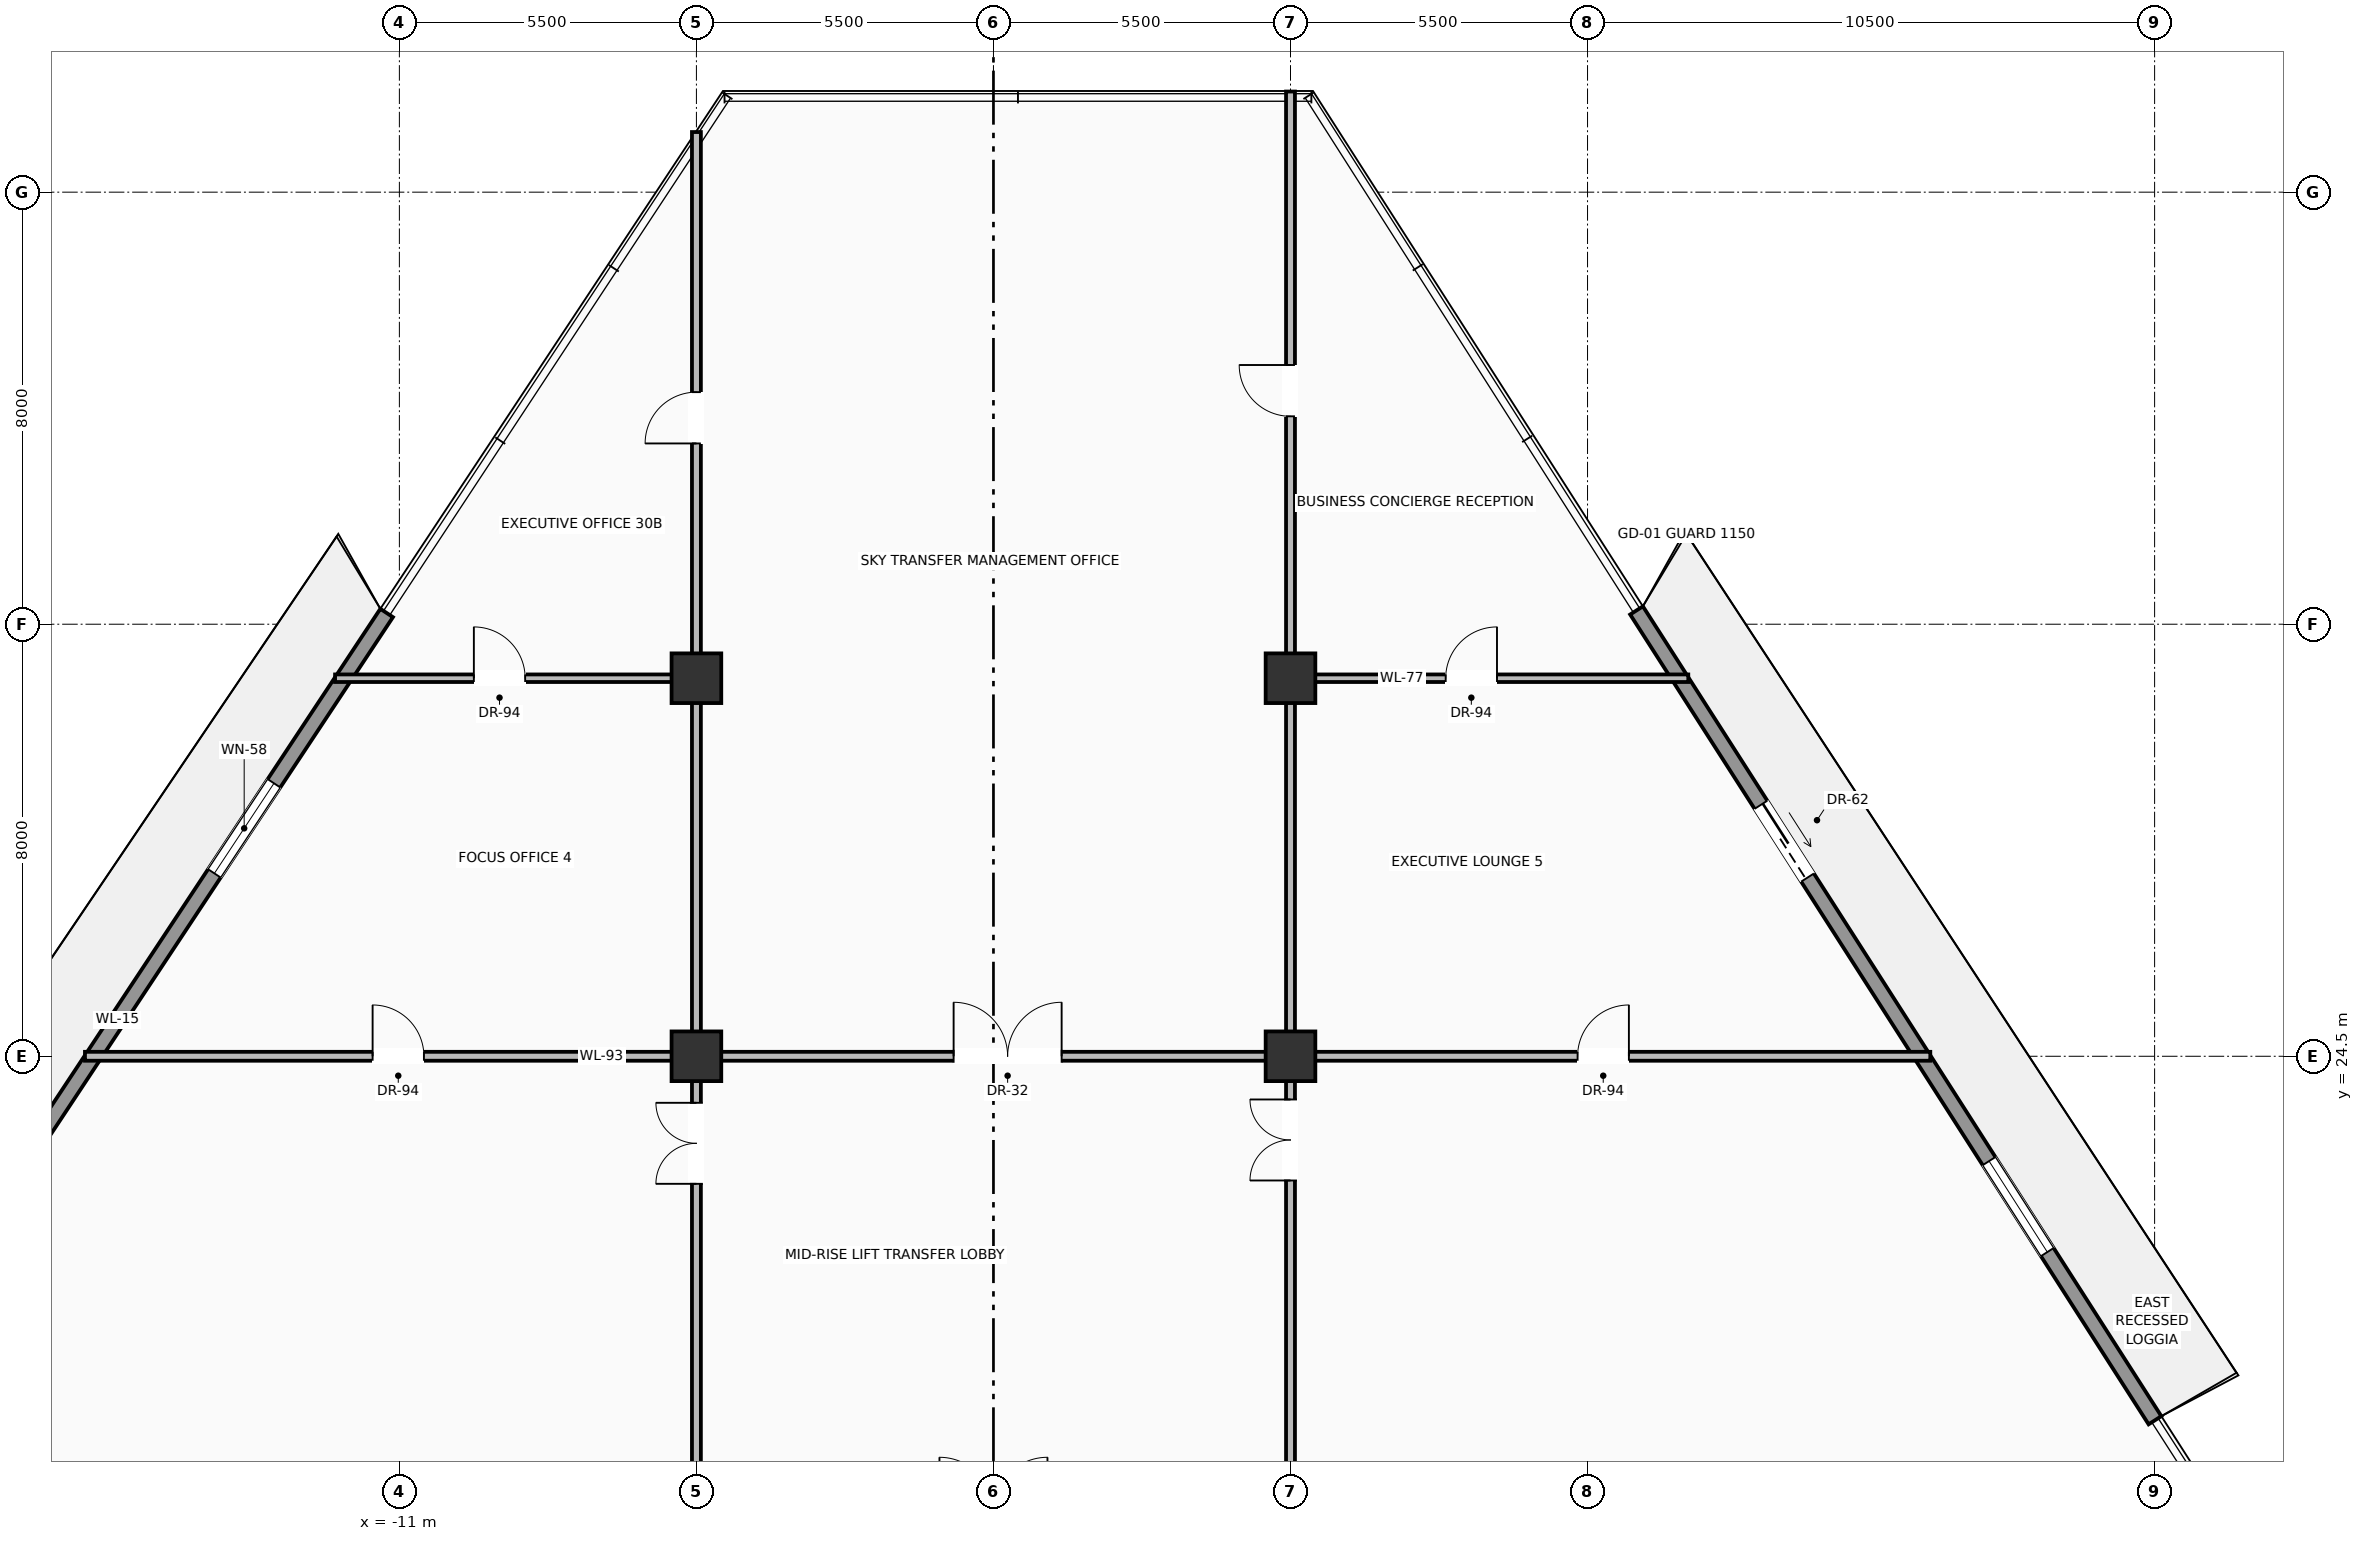
"""IFC4 building model, lengths in metres.
Left out: names, types, materials, properties, quantities, classifications, styles, units other than length and angle.
Written with IfcOpenShell. Run it as: python <this file> out.ifc"""

import sys

from ifc_helpers import new_model, si_unit, direction, frame, frame_2d, origin, origin_2d, place, context, subcontext, project, spatial, rectangle, extrude, source, transform, mapped, element, fill, save


model = new_model("IFC4")
c1 = context("Model", 3, precision=1e-05, world=origin(), true_north=direction((0.0, 1.0)))
c2 = subcontext(c1, "Body", "Model", "MODEL_VIEW")
j1 = project(units=[si_unit("LENGTHUNIT", "METRE"), si_unit("PLANEANGLEUNIT", "RADIAN")], contexts=[c1])
p1 = place(None, origin())
s1 = spatial("IfcSite", under=j1, at=p1, CompositionType="ELEMENT")
p2 = place(p1, origin())
s2 = spatial("IfcBuilding", under=s1, at=p2, CompositionType="ELEMENT")
p3 = place(p2, frame((0.0, 0.0, 121.0)))
s3 = spatial("IfcBuildingStorey", under=s2, at=p3, CompositionType="ELEMENT", Elevation=121.0)
m1 = source(origin(), c2, "Body", "SweptSolid", [
    extrude(rectangle(XDim=0.92, YDim=0.92, at=origin_2d()), origin(), (0.0, 0.0, 1.0), 4.6),
])
for number, where, z_axis, x_axis in (
    (1, (-5.5, 24.5, 0.0), (0.0, 0.0, 1.0), (1.0, 0.0, 0.0)),
    (2, (5.5, 24.5, 0.0), (0.0, 0.0, 1.0), (1.0, 0.0, 0.0)),
    (3, (-5.5, 31.5, 0.0), (0.0, 0.0, 1.0), (1.0, 0.0, 0.0)),
    (4, (5.5, 31.5, 0.0), (0.0, 0.0, 1.0), (1.0, 0.0, 0.0)),
):
    element("IfcColumn", number, at=place(p3, frame(where, z_axis=z_axis, x_axis=x_axis)), inside=s3, PredefinedType="COLUMN", context=c2, shape_type="MappedRepresentation", body=[
        mapped(m1, transform((0.0, 0.0, 0.0), scale=1.0)),
    ])
p4 = place(p3, frame((-21.204, 17.641, 0.0), z_axis=(0.0, 0.0, 1.0), x_axis=(0.551762134215, 0.834001527125, 0.0)))
e5 = element("IfcWall", 5, at=p4, inside=s3, PredefinedType="SOLIDWALL", context=c2, shape_type="SweptSolid", body=[
    extrude(rectangle(XDim=18.066, YDim=0.28, at=frame_2d((9.033, 0.0))), origin(), (0.0, 0.0, 1.0), 3.95),
])
p5 = place(p4, frame((4.336, 0.0, 0.0)))
e6 = element("IfcOpeningElement", 6, at=p5, cuts=e5, PredefinedType="OPENING", context=c2, shape_type="SweptSolid", body=[
    extrude(rectangle(XDim=1.6, YDim=2.35, at=frame_2d((0.8, 1.175))), frame((0.0, 0.15, 0.0), z_axis=(0.0, -1.0, 0.0), x_axis=(1.0, 0.0, 0.0)), (0.0, 0.0, 1.0), 0.3),
])
p6 = place(p4, frame((12.285, 0.0, 0.9)))
e7 = element("IfcOpeningElement", 7, at=p6, cuts=e5, PredefinedType="OPENING", context=c2, shape_type="SweptSolid", body=[
    extrude(rectangle(XDim=2.0, YDim=1.55, at=frame_2d((1.0, 0.775))), frame((0.0, 0.15, 0.0), z_axis=(0.0, -1.0, 0.0), x_axis=(1.0, 0.0, 0.0)), (0.0, 0.0, 1.0), 0.3),
])
p7 = place(p3, frame((11.907, 32.756, 0.0), z_axis=(0.0, 0.0, 1.0), x_axis=(0.53916264221, -0.842201665425, 0.0)))
e8 = element("IfcWall", 8, at=p7, inside=s3, PredefinedType="SOLIDWALL", context=c2, shape_type="SweptSolid", body=[
    extrude(rectangle(XDim=17.805, YDim=0.28, at=frame_2d((8.902, 0.0))), origin(), (0.0, 0.0, 1.0), 3.95),
])
p8 = place(p7, frame((4.273, 0.0, 0.0)))
e9 = element("IfcOpeningElement", 9, at=p8, cuts=e8, PredefinedType="OPENING", context=c2, shape_type="SweptSolid", body=[
    extrude(rectangle(XDim=1.6, YDim=2.35, at=frame_2d((0.8, 1.175))), frame((0.0, 0.15, 0.0), z_axis=(0.0, -1.0, 0.0), x_axis=(1.0, 0.0, 0.0)), (0.0, 0.0, 1.0), 0.3),
])
p9 = place(p7, frame((12.107, 0.0, 0.9)))
e10 = element("IfcOpeningElement", 10, at=p9, cuts=e8, PredefinedType="OPENING", context=c2, shape_type="SweptSolid", body=[
    extrude(rectangle(XDim=2.0, YDim=1.55, at=frame_2d((1.0, 0.775))), frame((0.0, 0.15, 0.0), z_axis=(0.0, -1.0, 0.0), x_axis=(1.0, 0.0, 0.0)), (0.0, 0.0, 1.0), 0.3),
])
p10 = place(p3, frame((-16.822, 24.5, 0.0), z_axis=(0.0, 0.0, 1.0), x_axis=(1.0, 0.0, 0.0)))
e11 = element("IfcWall", 11, at=p10, inside=s3, PredefinedType="PARTITIONING", context=c2, shape_type="SweptSolid", body=[
    extrude(rectangle(XDim=34.168, YDim=0.165, at=frame_2d((17.084, 0.0))), origin(), (0.0, 0.0, 1.0), 3.746),
])
p11 = place(p10, frame((16.084, 0.0, 0.0)))
e12 = element("IfcOpeningElement", 12, at=p11, cuts=e11, PredefinedType="OPENING", context=c2, shape_type="SweptSolid", body=[
    extrude(rectangle(XDim=2.0, YDim=2.4, at=frame_2d((1.0, 1.2))), frame((0.0, 0.093, 0.0), z_axis=(0.0, -1.0, 0.0), x_axis=(1.0, 0.0, 0.0)), (0.0, 0.0, 1.0), 0.185),
])
p12 = place(p10, frame((5.326, 0.0, 0.0)))
e13 = element("IfcOpeningElement", 13, at=p12, cuts=e11, PredefinedType="OPENING", context=c2, shape_type="SweptSolid", body=[
    extrude(rectangle(XDim=0.95, YDim=2.2, at=frame_2d((0.475, 1.1))), frame((0.0, 0.093, 0.0), z_axis=(0.0, -1.0, 0.0), x_axis=(1.0, 0.0, 0.0)), (0.0, 0.0, 1.0), 0.185),
])
p13 = place(p10, frame((27.637, 0.0, 0.0)))
e14 = element("IfcOpeningElement", 14, at=p13, cuts=e11, PredefinedType="OPENING", context=c2, shape_type="SweptSolid", body=[
    extrude(rectangle(XDim=0.95, YDim=2.2, at=frame_2d((0.475, 1.1))), frame((0.0, 0.093, 0.0), z_axis=(0.0, -1.0, 0.0), x_axis=(1.0, 0.0, 0.0)), (0.0, 0.0, 1.0), 0.185),
])
p14 = place(p3, frame((-5.5, 16.42, 0.0), z_axis=(0.0, 0.0, 1.0), x_axis=(0.0, 1.0, 0.0)))
e15 = element("IfcWall", 15, at=p14, inside=s3, PredefinedType="PARTITIONING", context=c2, shape_type="SweptSolid", body=[
    extrude(rectangle(XDim=25.193, YDim=0.165, at=frame_2d((12.597, 0.0))), origin(), (0.0, 0.0, 1.0), 3.746),
])
p15 = place(p14, frame((5.718, 0.0, 0.0)))
e16 = element("IfcOpeningElement", 16, at=p15, cuts=e15, PredefinedType="OPENING", context=c2, shape_type="SweptSolid", body=[
    extrude(rectangle(XDim=1.5, YDim=2.25, at=frame_2d((0.75, 1.125))), frame((0.0, 0.093, 0.0), z_axis=(0.0, -1.0, 0.0), x_axis=(1.0, 0.0, 0.0)), (0.0, 0.0, 1.0), 0.185),
])
p16 = place(p14, frame((19.427, 0.0, 0.0)))
e17 = element("IfcOpeningElement", 17, at=p16, cuts=e15, PredefinedType="OPENING", context=c2, shape_type="SweptSolid", body=[
    extrude(rectangle(XDim=0.95, YDim=2.2, at=frame_2d((0.475, 1.1))), frame((0.0, 0.093, 0.0), z_axis=(0.0, -1.0, 0.0), x_axis=(1.0, 0.0, 0.0)), (0.0, 0.0, 1.0), 0.185),
])
p17 = place(p3, frame((5.5, 16.42, 0.0), z_axis=(0.0, 0.0, 1.0), x_axis=(0.0, 1.0, 0.0)))
e18 = element("IfcWall", 18, at=p17, inside=s3, PredefinedType="PARTITIONING", context=c2, shape_type="SweptSolid", body=[
    extrude(rectangle(XDim=25.943, YDim=0.165, at=frame_2d((12.972, 0.0))), origin(), (0.0, 0.0, 1.0), 3.746),
])
p18 = place(p17, frame((5.78, 0.0, 0.0)))
e19 = element("IfcOpeningElement", 19, at=p18, cuts=e18, PredefinedType="OPENING", context=c2, shape_type="SweptSolid", body=[
    extrude(rectangle(XDim=1.5, YDim=2.25, at=frame_2d((0.75, 1.125))), frame((0.0, 0.093, 0.0), z_axis=(0.0, -1.0, 0.0), x_axis=(1.0, 0.0, 0.0)), (0.0, 0.0, 1.0), 0.185),
])
p19 = place(p17, frame((19.929, 0.0, 0.0)))
e20 = element("IfcOpeningElement", 20, at=p19, cuts=e18, PredefinedType="OPENING", context=c2, shape_type="SweptSolid", body=[
    extrude(rectangle(XDim=0.95, YDim=2.2, at=frame_2d((0.475, 1.1))), frame((0.0, 0.093, 0.0), z_axis=(0.0, -1.0, 0.0), x_axis=(1.0, 0.0, 0.0)), (0.0, 0.0, 1.0), 0.185),
])
p20 = place(p3, frame((-12.191, 31.5, 0.0), z_axis=(0.0, 0.0, 1.0), x_axis=(1.0, 0.0, 0.0)))
e21 = element("IfcWall", 21, at=p20, inside=s3, PredefinedType="PARTITIONING", context=c2, shape_type="SweptSolid", body=[
    extrude(rectangle(XDim=6.691, YDim=0.14, at=frame_2d((3.345, 0.0))), origin(), (0.0, 0.0, 1.0), 3.746),
])
p21 = place(p20, frame((2.57, 0.0, 0.0)))
e22 = element("IfcOpeningElement", 22, at=p21, cuts=e21, PredefinedType="OPENING", context=c2, shape_type="SweptSolid", body=[
    extrude(rectangle(XDim=0.95, YDim=2.2, at=frame_2d((0.475, 1.1))), frame((0.0, 0.08, 0.0), z_axis=(0.0, -1.0, 0.0), x_axis=(1.0, 0.0, 0.0)), (0.0, 0.0, 1.0), 0.16),
])
p22 = place(p3, frame((5.5, 31.5, 0.0), z_axis=(0.0, 0.0, 1.0), x_axis=(1.0, 0.0, 0.0)))
e23 = element("IfcWall", 23, at=p22, inside=s3, PredefinedType="PARTITIONING", context=c2, shape_type="SweptSolid", body=[
    extrude(rectangle(XDim=7.365, YDim=0.14, at=frame_2d((3.683, 0.0))), origin(), (0.0, 0.0, 1.0), 3.746),
])
p23 = place(p22, frame((2.873, 0.0, 0.0)))
e24 = element("IfcOpeningElement", 24, at=p23, cuts=e23, PredefinedType="OPENING", context=c2, shape_type="SweptSolid", body=[
    extrude(rectangle(XDim=0.95, YDim=2.2, at=frame_2d((0.475, 1.1))), frame((0.0, 0.08, 0.0), z_axis=(0.0, -1.0, 0.0), x_axis=(1.0, 0.0, 0.0)), (0.0, 0.0, 1.0), 0.16),
])
m2 = source(origin(), c2, "Body", "SweptSolid", [
    extrude(rectangle(XDim=2.0, YDim=1.55, at=frame_2d((1.0, 0.775))), frame((0.0, 0.03, 0.0), z_axis=(0.0, -1.0, 0.0), x_axis=(1.0, 0.0, 0.0)), (0.0, 0.0, 1.0), 0.06),
])
p24 = place(p6, origin())
e25 = element("IfcWindow", 25, at=p24, inside=s3, PartitioningType="SINGLE_PANEL", PredefinedType="WINDOW", context=c2, shape_type="MappedRepresentation", body=[
    mapped(m2, transform((0.0, 0.0, 0.0), scale=1.0)),
])
fill(e7, e25)
m3 = source(origin(), c2, "Body", "SweptSolid", [
    extrude(rectangle(XDim=1.6, YDim=2.35, at=frame_2d((0.8, 1.175))), frame((0.0, 0.025, 0.0), z_axis=(0.0, -1.0, 0.0), x_axis=(1.0, 0.0, 0.0)), (0.0, 0.0, 1.0), 0.05),
])
p25 = place(p8, origin())
e26 = element("IfcDoor", 26, at=p25, inside=s3, OperationType="SLIDING_TO_RIGHT", PredefinedType="DOOR", context=c2, shape_type="MappedRepresentation", body=[
    mapped(m3, transform((0.0, 0.0, 0.0), scale=1.0)),
])
fill(e9, e26)
p26 = place(p9, origin())
e27 = element("IfcWindow", 27, at=p26, inside=s3, PartitioningType="SINGLE_PANEL", PredefinedType="WINDOW", context=c2, shape_type="MappedRepresentation", body=[
    mapped(m2, transform((0.0, 0.0, 0.0), scale=1.0)),
])
fill(e10, e27)
m4 = source(origin(), c2, "Body", "SweptSolid", [
    extrude(rectangle(XDim=2.0, YDim=2.4, at=frame_2d((1.0, 1.2))), frame((0.0, 0.025, 0.0), z_axis=(0.0, -1.0, 0.0), x_axis=(1.0, 0.0, 0.0)), (0.0, 0.0, 1.0), 0.05),
])
p27 = place(p11, origin())
e28 = element("IfcDoor", 28, at=p27, inside=s3, OperationType="DOUBLE_DOOR_SINGLE_SWING", PredefinedType="DOOR", context=c2, shape_type="MappedRepresentation", body=[
    mapped(m4, transform((0.0, 0.0, 0.0), scale=1.0)),
])
fill(e12, e28)
m5 = source(origin(), c2, "Body", "SweptSolid", [
    extrude(rectangle(XDim=1.5, YDim=2.25, at=frame_2d((0.75, 1.125))), frame((0.0, 0.025, 0.0), z_axis=(0.0, -1.0, 0.0), x_axis=(1.0, 0.0, 0.0)), (0.0, 0.0, 1.0), 0.05),
])
p28 = place(p15, origin())
e29 = element("IfcDoor", 29, at=p28, inside=s3, OperationType="DOUBLE_DOOR_SINGLE_SWING", PredefinedType="DOOR", context=c2, shape_type="MappedRepresentation", body=[
    mapped(m5, transform((0.0, 0.0, 0.0), scale=1.0)),
])
fill(e16, e29)
p29 = place(p18, origin())
e30 = element("IfcDoor", 30, at=p29, inside=s3, OperationType="DOUBLE_DOOR_SINGLE_SWING", PredefinedType="DOOR", context=c2, shape_type="MappedRepresentation", body=[
    mapped(m5, transform((0.0, 0.0, 0.0), scale=1.0)),
])
fill(e19, e30)
m6 = source(origin(), c2, "Body", "SweptSolid", [
    extrude(rectangle(XDim=0.95, YDim=2.2, at=frame_2d((0.475, 1.1))), frame((0.0, 0.025, 0.0), z_axis=(0.0, -1.0, 0.0), x_axis=(1.0, 0.0, 0.0)), (0.0, 0.0, 1.0), 0.05),
])
p30 = place(p21, origin())
e31 = element("IfcDoor", 31, at=p30, inside=s3, OperationType="SINGLE_SWING_LEFT", PredefinedType="DOOR", context=c2, shape_type="MappedRepresentation", body=[
    mapped(m6, transform((0.0, 0.0, 0.0), scale=1.0)),
])
fill(e22, e31)
p31 = place(p23, origin())
e32 = element("IfcDoor", 32, at=p31, inside=s3, OperationType="SINGLE_SWING_RIGHT", PredefinedType="DOOR", context=c2, shape_type="MappedRepresentation", body=[
    mapped(m6, transform((0.0, 0.0, 0.0), scale=1.0)),
])
fill(e24, e32)
p32 = place(p12, origin())
e33 = element("IfcDoor", 33, at=p32, inside=s3, OperationType="SINGLE_SWING_LEFT", PredefinedType="DOOR", context=c2, shape_type="MappedRepresentation", body=[
    mapped(m6, transform((0.0, 0.0, 0.0), scale=1.0)),
])
fill(e13, e33)
p33 = place(p13, origin())
e34 = element("IfcDoor", 34, at=p33, inside=s3, OperationType="SINGLE_SWING_RIGHT", PredefinedType="DOOR", context=c2, shape_type="MappedRepresentation", body=[
    mapped(m6, transform((0.0, 0.0, 0.0), scale=1.0)),
])
fill(e14, e34)
p34 = place(p16, origin())
e35 = element("IfcDoor", 35, at=p34, inside=s3, OperationType="SINGLE_SWING_LEFT", PredefinedType="DOOR", context=c2, shape_type="MappedRepresentation", body=[
    mapped(m6, transform((0.0, 0.0, 0.0), scale=1.0)),
])
fill(e17, e35)
p35 = place(p19, origin())
e36 = element("IfcDoor", 36, at=p35, inside=s3, OperationType="SINGLE_SWING_RIGHT", PredefinedType="DOOR", context=c2, shape_type="MappedRepresentation", body=[
    mapped(m6, transform((0.0, 0.0, 0.0), scale=1.0)),
])
fill(e20, e36)
save(model, sys.argv[1])
